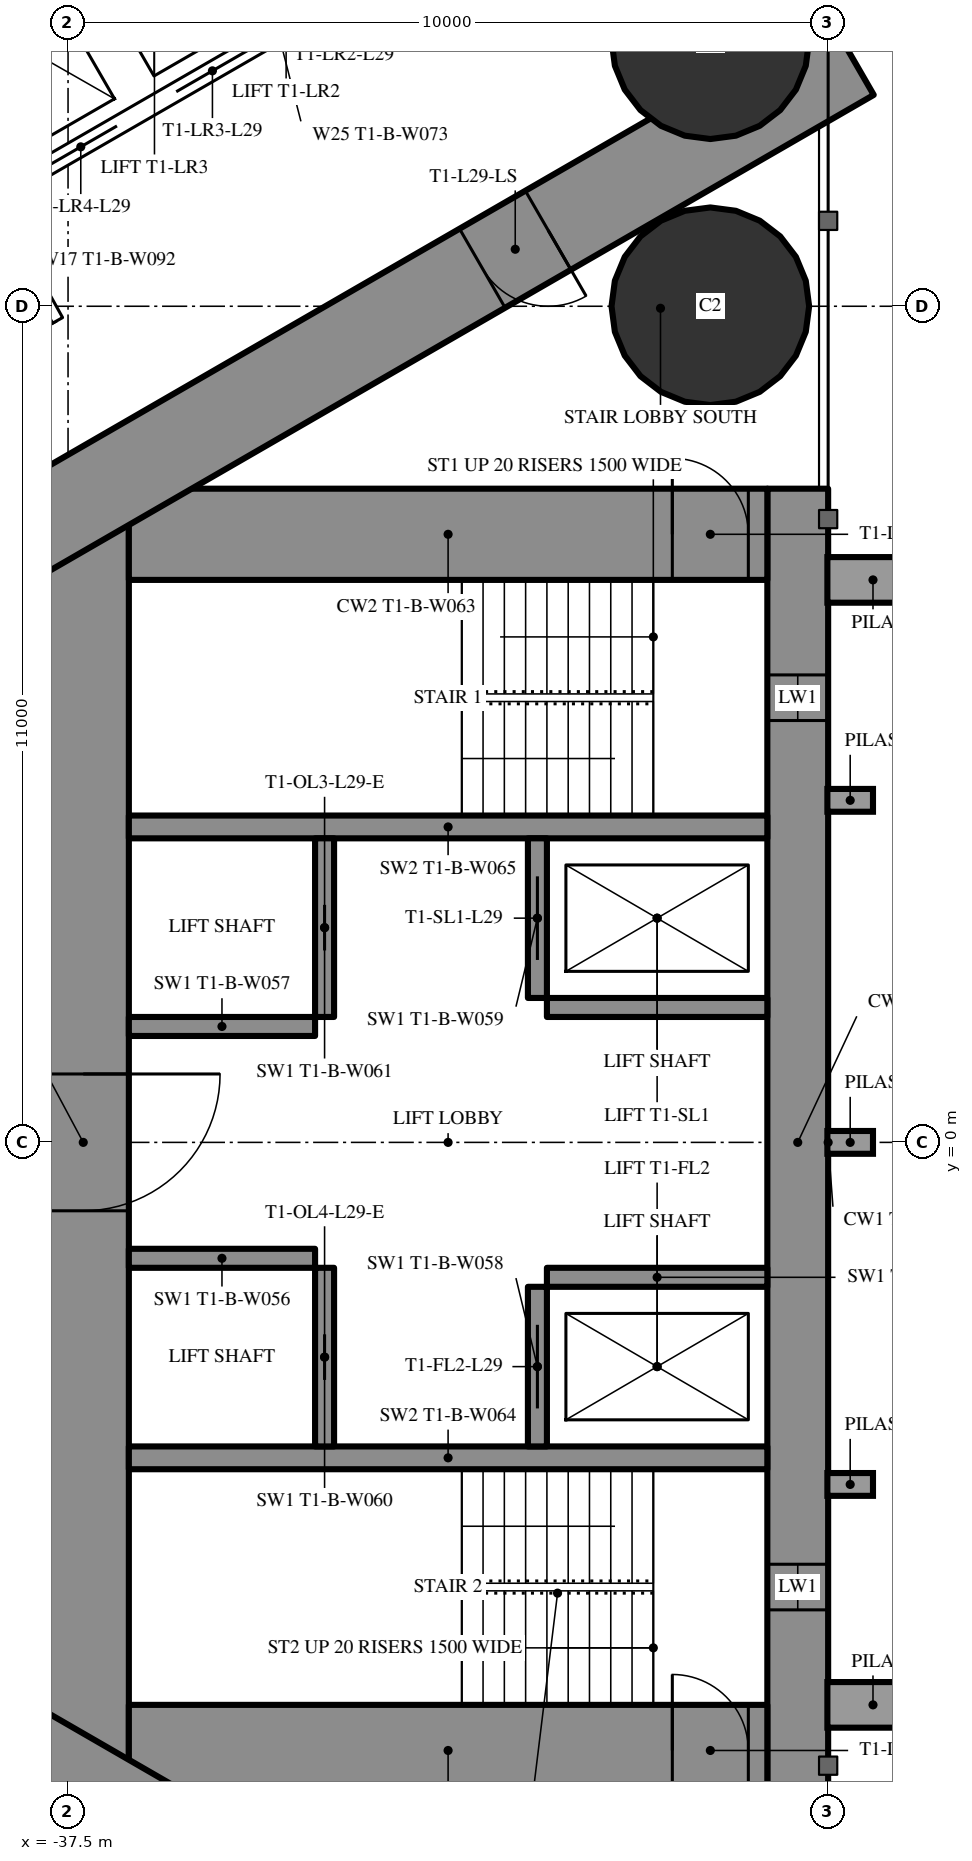
"""IFC4 building model, lengths in metres.
Left out: names, types, materials, properties, quantities, classifications, styles, units other than length and angle.
Written with IfcOpenShell. Run it as: python <this file> out.ifc"""

import sys

from ifc_helpers import new_model, si_unit, direction, frame, frame_2d, origin, origin_2d, place, context, subcontext, project, spatial, rectangle, hollow_circle, extrude, element, fill, save


model = new_model("IFC4")
c1 = context("Model", 3, precision=1e-05, world=origin(), true_north=direction((0.0, 1.0)))
c2 = subcontext(c1, "Body", "Model", "MODEL_VIEW")
j1 = project(units=[si_unit("LENGTHUNIT", "METRE"), si_unit("PLANEANGLEUNIT", "RADIAN")], contexts=[c1])
p1 = place(None, origin())
s1 = spatial("IfcSite", under=j1, at=p1, CompositionType="ELEMENT")
p2 = place(p1, origin())
s2 = spatial("IfcBuilding", under=s1, at=p2, CompositionType="ELEMENT")
p3 = place(p2, frame((0.0, 0.0, 111.6)))
s3 = spatial("IfcBuildingStorey", under=s2, at=p3, CompositionType="ELEMENT", Elevation=111.6)
for number, where, z_axis, x_axis in (
    (1, (-29.05, 11.0, 0.0), (0.0, 0.0, 1.0), (1.0, 0.0, 0.0)),
    (2, (-29.05, 14.5, 0.0), (0.0, 0.0, 1.0), (1.0, 0.0, 0.0)),
):
    element("IfcColumn", number, at=place(p3, frame(where, z_axis=z_axis, x_axis=x_axis)), inside=s3, PredefinedType="COLUMN", context=c2, shape_type="SweptSolid", body=[
        extrude(hollow_circle(Radius=1.3, WallThickness=0.1, at=origin_2d()), origin(), (0.0, 0.0, 1.0), 3.5),
    ])
p4 = place(p3, frame((-27.9, 8.6, 0.0), z_axis=(0.0, 0.0, 1.0), x_axis=(0.0, -1.0, 0.0)))
e3 = element("IfcWall", 3, at=p4, inside=s3, PredefinedType="SHEAR", context=c2, shape_type="SweptSolid", body=[
    extrude(rectangle(XDim=17.2, YDim=0.8, at=frame_2d((8.6, 0.0))), origin(), (0.0, 0.0, 1.0), 3.5),
])
p5 = place(p4, frame((2.45, 0.0, 0.6)))
e4 = element("IfcOpeningElement", 4, at=p5, cuts=e3, PredefinedType="OPENING", context=c2, shape_type="SweptSolid", body=[
    extrude(rectangle(XDim=0.6, YDim=2.1, at=frame_2d((0.3, 1.05))), frame((0.0, 0.41, 0.0), z_axis=(0.0, -1.0, 0.0), x_axis=(1.0, 0.0, 0.0)), (0.0, 0.0, 1.0), 0.82),
])
p6 = place(p4, frame((14.15, 0.0, 0.6)))
e5 = element("IfcOpeningElement", 5, at=p6, cuts=e3, PredefinedType="OPENING", context=c2, shape_type="SweptSolid", body=[
    extrude(rectangle(XDim=0.6, YDim=2.1, at=frame_2d((0.3, 1.05))), frame((0.0, 0.41, 0.0), z_axis=(0.0, -1.0, 0.0), x_axis=(1.0, 0.0, 0.0)), (0.0, 0.0, 1.0), 0.82),
])
p7 = place(p3, frame((-37.3, 8.6, 0.0), z_axis=(0.0, 0.0, 1.0), x_axis=(0.0, -1.0, 0.0)))
e6 = element("IfcWall", 6, at=p7, inside=s3, PredefinedType="SHEAR", context=c2, shape_type="SweptSolid", body=[
    extrude(rectangle(XDim=17.2, YDim=1.2, at=frame_2d((8.6, 0.0))), origin(), (0.0, 0.0, 1.0), 3.5),
])
p8 = place(p7, frame((7.7, 0.0, 0.0)))
e7 = element("IfcOpeningElement", 7, at=p8, cuts=e6, PredefinedType="OPENING", context=c2, shape_type="SweptSolid", body=[
    extrude(rectangle(XDim=1.8, YDim=2.2, at=frame_2d((0.9, 1.1))), frame((0.0, 0.61, 0.0), z_axis=(0.0, -1.0, 0.0), x_axis=(1.0, 0.0, 0.0)), (0.0, 0.0, 1.0), 1.22),
])
p9 = place(p3, frame((-28.3, 8.0, 0.0), z_axis=(0.0, 0.0, 1.0), x_axis=(-1.0, 0.0, 0.0)))
e8 = element("IfcWall", 8, at=p9, inside=s3, PredefinedType="SHEAR", context=c2, shape_type="SweptSolid", body=[
    extrude(rectangle(XDim=8.4, YDim=1.2, at=frame_2d((4.2, 0.0))), origin(), (0.0, 0.0, 1.0), 3.5),
])
p10 = place(p9, frame((0.25, 0.0, 0.0)))
e9 = element("IfcOpeningElement", 9, at=p10, cuts=e8, PredefinedType="OPENING", context=c2, shape_type="SweptSolid", body=[
    extrude(rectangle(XDim=1.0, YDim=2.2, at=frame_2d((0.5, 1.1))), frame((0.0, 0.61, 0.0), z_axis=(0.0, -1.0, 0.0), x_axis=(1.0, 0.0, 0.0)), (0.0, 0.0, 1.0), 1.22),
])
p11 = place(p3, frame((-28.3, -8.0, 0.0), z_axis=(0.0, 0.0, 1.0), x_axis=(-1.0, 0.0, 0.0)))
e10 = element("IfcWall", 10, at=p11, inside=s3, PredefinedType="SHEAR", context=c2, shape_type="SweptSolid", body=[
    extrude(rectangle(XDim=8.4, YDim=1.2, at=frame_2d((4.2, 0.0))), origin(), (0.0, 0.0, 1.0), 3.5),
])
p12 = place(p11, frame((0.25, 0.0, 0.0)))
e11 = element("IfcOpeningElement", 11, at=p12, cuts=e10, PredefinedType="OPENING", context=c2, shape_type="SweptSolid", body=[
    extrude(rectangle(XDim=1.0, YDim=2.2, at=frame_2d((0.5, 1.1))), frame((0.0, 0.61, 0.0), z_axis=(0.0, -1.0, 0.0), x_axis=(1.0, 0.0, 0.0)), (0.0, 0.0, 1.0), 1.22),
])
for number, where, z_axis, x_axis in (
    (12, (-28.3, 4.15, 0.0), (0.0, 0.0, 1.0), (-1.0, 0.0, 0.0)),
    (13, (-28.3, -4.15, 0.0), (0.0, 0.0, 1.0), (-1.0, 0.0, 0.0)),
):
    element("IfcWall", number, at=place(p3, frame(where, z_axis=z_axis, x_axis=x_axis)), inside=s3, PredefinedType="SHEAR", context=c2, shape_type="SweptSolid", body=[
        extrude(rectangle(XDim=8.4, YDim=0.3, at=frame_2d((4.2, 0.0))), origin(), (0.0, 0.0, 1.0), 3.5),
    ])
p13 = place(p3, frame((-31.325, 4.0, 0.0), z_axis=(0.0, 0.0, 1.0), x_axis=(0.0, -1.0, 0.0)))
e14 = element("IfcWall", 14, at=p13, inside=s3, PredefinedType="SHEAR", context=c2, shape_type="SweptSolid", body=[
    extrude(rectangle(XDim=2.1, YDim=0.25, at=frame_2d((1.05, 0.0))), origin(), (0.0, 0.0, 1.0), 3.5),
])
p14 = place(p13, frame((0.5, 0.0, 0.0)))
e15 = element("IfcOpeningElement", 15, at=p14, cuts=e14, PredefinedType="OPENING", context=c2, shape_type="SweptSolid", body=[
    extrude(rectangle(XDim=1.1, YDim=2.2, at=frame_2d((0.55, 1.1))), frame((0.0, 0.135, 0.0), z_axis=(0.0, -1.0, 0.0), x_axis=(1.0, 0.0, 0.0)), (0.0, 0.0, 1.0), 0.27),
])
p15 = place(p3, frame((-34.125, 4.0, 0.0), z_axis=(0.0, 0.0, 1.0), x_axis=(0.0, -1.0, 0.0)))
e16 = element("IfcWall", 16, at=p15, inside=s3, PredefinedType="SHEAR", context=c2, shape_type="SweptSolid", body=[
    extrude(rectangle(XDim=2.35, YDim=0.25, at=frame_2d((1.175, 0.0))), origin(), (0.0, 0.0, 1.0), 3.5),
])
p16 = place(p15, frame((0.875, 0.0, 0.0)))
e17 = element("IfcOpeningElement", 17, at=p16, cuts=e16, PredefinedType="OPENING", context=c2, shape_type="SweptSolid", body=[
    extrude(rectangle(XDim=0.6, YDim=2.0, at=frame_2d((0.3, 1.0))), frame((0.0, 0.135, 0.0), z_axis=(0.0, -1.0, 0.0), x_axis=(1.0, 0.0, 0.0)), (0.0, 0.0, 1.0), 0.27),
])
p17 = place(p3, frame((-28.3, 1.775, 0.0), z_axis=(0.0, 0.0, 1.0), x_axis=(-1.0, 0.0, 0.0)))
e18 = element("IfcWall", 18, at=p17, inside=s3, PredefinedType="SHEAR", context=c2, shape_type="SweptSolid", body=[
    extrude(rectangle(XDim=2.9, YDim=0.25, at=frame_2d((1.45, 0.0))), origin(), (0.0, 0.0, 1.0), 3.5),
])
p18 = place(p3, frame((-34.25, 1.525, 0.0), z_axis=(0.0, 0.0, 1.0), x_axis=(-1.0, 0.0, 0.0)))
e19 = element("IfcWall", 19, at=p18, inside=s3, PredefinedType="SHEAR", context=c2, shape_type="SweptSolid", body=[
    extrude(rectangle(XDim=2.45, YDim=0.25, at=frame_2d((1.225, 0.0))), origin(), (0.0, 0.0, 1.0), 3.5),
])
p19 = place(p3, frame((-31.325, -1.9, 0.0), z_axis=(0.0, 0.0, 1.0), x_axis=(0.0, -1.0, 0.0)))
e20 = element("IfcWall", 20, at=p19, inside=s3, PredefinedType="SHEAR", context=c2, shape_type="SweptSolid", body=[
    extrude(rectangle(XDim=2.1, YDim=0.25, at=frame_2d((1.05, 0.0))), origin(), (0.0, 0.0, 1.0), 3.5),
])
p20 = place(p19, frame((0.5, 0.0, 0.0)))
e21 = element("IfcOpeningElement", 21, at=p20, cuts=e20, PredefinedType="OPENING", context=c2, shape_type="SweptSolid", body=[
    extrude(rectangle(XDim=1.1, YDim=2.2, at=frame_2d((0.55, 1.1))), frame((0.0, 0.135, 0.0), z_axis=(0.0, -1.0, 0.0), x_axis=(1.0, 0.0, 0.0)), (0.0, 0.0, 1.0), 0.27),
])
p21 = place(p3, frame((-34.125, -1.65, 0.0), z_axis=(0.0, 0.0, 1.0), x_axis=(0.0, -1.0, 0.0)))
e22 = element("IfcWall", 22, at=p21, inside=s3, PredefinedType="SHEAR", context=c2, shape_type="SweptSolid", body=[
    extrude(rectangle(XDim=2.35, YDim=0.25, at=frame_2d((1.175, 0.0))), origin(), (0.0, 0.0, 1.0), 3.5),
])
p22 = place(p21, frame((0.875, 0.0, 0.0)))
e23 = element("IfcOpeningElement", 23, at=p22, cuts=e22, PredefinedType="OPENING", context=c2, shape_type="SweptSolid", body=[
    extrude(rectangle(XDim=0.6, YDim=2.0, at=frame_2d((0.3, 1.0))), frame((0.0, 0.135, 0.0), z_axis=(0.0, -1.0, 0.0), x_axis=(1.0, 0.0, 0.0)), (0.0, 0.0, 1.0), 0.27),
])
p23 = place(p3, frame((-28.3, -1.775, 0.0), z_axis=(0.0, 0.0, 1.0), x_axis=(-1.0, 0.0, 0.0)))
e24 = element("IfcWall", 24, at=p23, inside=s3, PredefinedType="SHEAR", context=c2, shape_type="SweptSolid", body=[
    extrude(rectangle(XDim=2.9, YDim=0.25, at=frame_2d((1.45, 0.0))), origin(), (0.0, 0.0, 1.0), 3.5),
])
p24 = place(p3, frame((-34.25, -1.525, 0.0), z_axis=(0.0, 0.0, 1.0), x_axis=(-1.0, 0.0, 0.0)))
e25 = element("IfcWall", 25, at=p24, inside=s3, PredefinedType="SHEAR", context=c2, shape_type="SweptSolid", body=[
    extrude(rectangle(XDim=2.45, YDim=0.25, at=frame_2d((1.225, 0.0))), origin(), (0.0, 0.0, 1.0), 3.5),
])
p25 = place(p3, frame((-27.2, 14.3, 0.0), z_axis=(0.0, 0.0, 1.0), x_axis=(-0.866026593062, -0.499997940104, 0.0)))
e26 = element("IfcWall", 26, at=p25, inside=s3, PredefinedType="SHEAR", context=c2, shape_type="SweptSolid", body=[
    extrude(rectangle(XDim=28.946, YDim=1.2, at=frame_2d((14.473, 0.0))), origin(), (0.0, 0.0, 1.0), 3.5),
])
p26 = place(p25, frame((4.6, 0.0, 0.0)))
e27 = element("IfcOpeningElement", 27, at=p26, cuts=e26, PredefinedType="OPENING", context=c2, shape_type="SweptSolid", body=[
    extrude(rectangle(XDim=1.0, YDim=2.2, at=frame_2d((0.5, 1.1))), frame((0.0, 0.61, 0.0), z_axis=(0.0, -1.0, 0.0), x_axis=(1.0, 0.0, 0.0)), (0.0, 0.0, 1.0), 1.22),
])
p27 = place(p25, frame((13.395, 0.0, 0.0)))
e28 = element("IfcOpeningElement", 28, at=p27, cuts=e26, PredefinedType="OPENING", context=c2, shape_type="SweptSolid", body=[
    extrude(rectangle(XDim=1.8, YDim=2.2, at=frame_2d((0.9, 1.1))), frame((0.0, 0.61, 0.0), z_axis=(0.0, -1.0, 0.0), x_axis=(1.0, 0.0, 0.0)), (0.0, 0.0, 1.0), 1.22),
])
p28 = place(p3, frame((-27.2, -14.3, 0.0), z_axis=(0.0, 0.0, 1.0), x_axis=(-0.866024021859, 0.500002393557, 0.0)))
e29 = element("IfcWall", 29, at=p28, inside=s3, PredefinedType="SHEAR", context=c2, shape_type="SweptSolid", body=[
    extrude(rectangle(XDim=27.907, YDim=1.2, at=frame_2d((13.954, 0.0))), origin(), (0.0, 0.0, 1.0), 3.5),
])
p29 = place(p28, frame((4.6, 0.0, 0.0)))
e30 = element("IfcOpeningElement", 30, at=p29, cuts=e29, PredefinedType="OPENING", context=c2, shape_type="SweptSolid", body=[
    extrude(rectangle(XDim=1.0, YDim=2.2, at=frame_2d((0.5, 1.1))), frame((0.0, 0.61, 0.0), z_axis=(0.0, -1.0, 0.0), x_axis=(1.0, 0.0, 0.0)), (0.0, 0.0, 1.0), 1.22),
])
p30 = place(p28, frame((13.395, 0.0, 0.0)))
e31 = element("IfcOpeningElement", 31, at=p30, cuts=e29, PredefinedType="OPENING", context=c2, shape_type="SweptSolid", body=[
    extrude(rectangle(XDim=1.8, YDim=2.2, at=frame_2d((0.9, 1.1))), frame((0.0, 0.61, 0.0), z_axis=(0.0, -1.0, 0.0), x_axis=(1.0, 0.0, 0.0)), (0.0, 0.0, 1.0), 1.22),
])
p31 = place(p3, frame((-37.7, 10.894, 0.0), z_axis=(0.0, 0.0, 1.0), x_axis=(-0.866027905338, -0.499995667157, 0.0)))
e32 = element("IfcWall", 32, at=p31, inside=s3, PredefinedType="PARTITIONING", context=c2, shape_type="SweptSolid", body=[
    extrude(rectangle(XDim=21.787, YDim=0.2, at=frame_2d((10.894, 0.0))), origin(), (0.0, 0.0, 1.0), 3.25),
])
p32 = place(p31, frame((11.23, 0.0, 0.0)))
e33 = element("IfcOpeningElement", 33, at=p32, cuts=e32, PredefinedType="OPENING", context=c2, shape_type="SweptSolid", body=[
    extrude(rectangle(XDim=0.95, YDim=2.2, at=frame_2d((0.475, 1.1))), frame((0.0, 0.11, 0.0), z_axis=(0.0, -1.0, 0.0), x_axis=(1.0, 0.0, 0.0)), (0.0, 0.0, 1.0), 0.22),
])
p33 = place(p31, frame((9.531, 0.0, 0.0)))
e34 = element("IfcOpeningElement", 34, at=p33, cuts=e32, PredefinedType="OPENING", context=c2, shape_type="SweptSolid", body=[
    extrude(rectangle(XDim=0.95, YDim=2.2, at=frame_2d((0.475, 1.1))), frame((0.0, 0.11, 0.0), z_axis=(0.0, -1.0, 0.0), x_axis=(1.0, 0.0, 0.0)), (0.0, 0.0, 1.0), 0.22),
])
p34 = place(p3, frame((-38.513, 12.392, 0.0), z_axis=(0.0, 0.0, 1.0), x_axis=(0.485585508183, -0.874189175317, 0.0)))
e35 = element("IfcWall", 35, at=p34, inside=s3, PredefinedType="PARTITIONING", context=c2, shape_type="SweptSolid", body=[
    extrude(rectangle(XDim=1.805, YDim=0.15, at=frame_2d((0.902, 0.0))), origin(), (0.0, 0.0, 1.0), 3.25),
])
p35 = place(p3, frame((-36.92, -11.344, 0.0), z_axis=(0.0, 0.0, 1.0), x_axis=(-0.866027897759, 0.499995680284, 0.0)))
e36 = element("IfcWall", 36, at=p35, inside=s3, PredefinedType="PARTITIONING", context=c2, shape_type="SweptSolid", body=[
    extrude(rectangle(XDim=11.731, YDim=0.2, at=frame_2d((5.865, 0.0))), origin(), (0.0, 0.0, 1.0), 3.25),
])
p36 = place(p35, frame((3.35, 0.0, 0.0)))
e37 = element("IfcOpeningElement", 37, at=p36, cuts=e36, PredefinedType="OPENING", context=c2, shape_type="SweptSolid", body=[
    extrude(rectangle(XDim=1.0, YDim=2.2, at=frame_2d((0.5, 1.1))), frame((0.0, 0.11, 0.0), z_axis=(0.0, -1.0, 0.0), x_axis=(1.0, 0.0, 0.0)), (0.0, 0.0, 1.0), 0.22),
])
p37 = place(p3, frame((-31.01, 16.747, 0.0), z_axis=(0.0, 0.0, 1.0), x_axis=(-0.866028165386, -0.499995216735, 0.0)))
e38 = element("IfcWall", 38, at=p37, inside=s3, PredefinedType="PARTITIONING", context=c2, shape_type="SweptSolid", body=[
    extrude(rectangle(XDim=8.6, YDim=0.25, at=frame_2d((4.3, 0.0))), origin(), (0.0, 0.0, 1.0), 3.25),
])
p38 = place(p37, frame((0.75, 0.0, 0.0)))
e39 = element("IfcOpeningElement", 39, at=p38, cuts=e38, PredefinedType="OPENING", context=c2, shape_type="SweptSolid", body=[
    extrude(rectangle(XDim=1.1, YDim=2.2, at=frame_2d((0.55, 1.1))), frame((0.0, 0.135, 0.0), z_axis=(0.0, -1.0, 0.0), x_axis=(1.0, 0.0, 0.0)), (0.0, 0.0, 1.0), 0.27),
])
p39 = place(p37, frame((2.75, 0.0, 0.0)))
e40 = element("IfcOpeningElement", 40, at=p39, cuts=e38, PredefinedType="OPENING", context=c2, shape_type="SweptSolid", body=[
    extrude(rectangle(XDim=1.1, YDim=2.2, at=frame_2d((0.55, 1.1))), frame((0.0, 0.135, 0.0), z_axis=(0.0, -1.0, 0.0), x_axis=(1.0, 0.0, 0.0)), (0.0, 0.0, 1.0), 0.27),
])
p40 = place(p37, frame((4.75, 0.0, 0.0)))
e41 = element("IfcOpeningElement", 41, at=p40, cuts=e38, PredefinedType="OPENING", context=c2, shape_type="SweptSolid", body=[
    extrude(rectangle(XDim=1.1, YDim=2.2, at=frame_2d((0.55, 1.1))), frame((0.0, 0.135, 0.0), z_axis=(0.0, -1.0, 0.0), x_axis=(1.0, 0.0, 0.0)), (0.0, 0.0, 1.0), 0.27),
])
p41 = place(p37, frame((6.75, 0.0, 0.0)))
e42 = element("IfcOpeningElement", 42, at=p41, cuts=e38, PredefinedType="OPENING", context=c2, shape_type="SweptSolid", body=[
    extrude(rectangle(XDim=1.1, YDim=2.2, at=frame_2d((0.55, 1.1))), frame((0.0, 0.135, 0.0), z_axis=(0.0, -1.0, 0.0), x_axis=(1.0, 0.0, 0.0)), (0.0, 0.0, 1.0), 0.27),
])
p42 = place(p26, origin())
e43 = element("IfcDoor", 43, at=p42, inside=s3, OperationType="SINGLE_SWING_LEFT", PredefinedType="DOOR", context=c2, shape_type="SweptSolid", body=[
    extrude(rectangle(XDim=1.0, YDim=2.2, at=frame_2d((0.5, 1.1))), frame((0.0, 0.025, 0.0), z_axis=(0.0, -1.0, 0.0), x_axis=(1.0, 0.0, 0.0)), (0.0, 0.0, 1.0), 0.05),
])
fill(e27, e43)
p43 = place(p8, origin())
e44 = element("IfcDoor", 44, at=p43, inside=s3, OperationType="DOUBLE_DOOR_SINGLE_SWING", PredefinedType="DOOR", context=c2, shape_type="SweptSolid", body=[
    extrude(rectangle(XDim=1.8, YDim=2.2, at=frame_2d((0.9, 1.1))), frame((0.0, 0.025, 0.0), z_axis=(0.0, -1.0, 0.0), x_axis=(1.0, 0.0, 0.0)), (0.0, 0.0, 1.0), 0.05),
])
fill(e7, e44)
p44 = place(p10, origin())
e45 = element("IfcDoor", 45, at=p44, inside=s3, OperationType="SINGLE_SWING_RIGHT", PredefinedType="DOOR", context=c2, shape_type="SweptSolid", body=[
    extrude(rectangle(XDim=1.0, YDim=2.2, at=frame_2d((0.5, 1.1))), frame((0.0, 0.025, 0.0), z_axis=(0.0, -1.0, 0.0), x_axis=(1.0, 0.0, 0.0)), (0.0, 0.0, 1.0), 0.05),
])
fill(e9, e45)
p45 = place(p12, origin())
e46 = element("IfcDoor", 46, at=p45, inside=s3, OperationType="SINGLE_SWING_RIGHT", PredefinedType="DOOR", context=c2, shape_type="SweptSolid", body=[
    extrude(rectangle(XDim=1.0, YDim=2.2, at=frame_2d((0.5, 1.1))), frame((0.0, 0.025, 0.0), z_axis=(0.0, -1.0, 0.0), x_axis=(1.0, 0.0, 0.0)), (0.0, 0.0, 1.0), 0.05),
])
fill(e11, e46)
p46 = place(p14, origin())
e47 = element("IfcDoor", 47, at=p46, inside=s3, OperationType="SLIDING_TO_LEFT", PredefinedType="USERDEFINED", context=c2, shape_type="SweptSolid", body=[
    extrude(rectangle(XDim=1.1, YDim=2.2, at=frame_2d((0.55, 1.1))), frame((0.0, 0.025, 0.0), z_axis=(0.0, -1.0, 0.0), x_axis=(1.0, 0.0, 0.0)), (0.0, 0.0, 1.0), 0.05),
])
fill(e15, e47)
p47 = place(p20, origin())
e48 = element("IfcDoor", 48, at=p47, inside=s3, OperationType="SLIDING_TO_LEFT", PredefinedType="USERDEFINED", context=c2, shape_type="SweptSolid", body=[
    extrude(rectangle(XDim=1.1, YDim=2.2, at=frame_2d((0.55, 1.1))), frame((0.0, 0.025, 0.0), z_axis=(0.0, -1.0, 0.0), x_axis=(1.0, 0.0, 0.0)), (0.0, 0.0, 1.0), 0.05),
])
fill(e21, e48)
p48 = place(p16, origin())
e49 = element("IfcDoor", 49, at=p48, inside=s3, OperationType="SLIDING_TO_LEFT", PredefinedType="DOOR", context=c2, shape_type="SweptSolid", body=[
    extrude(rectangle(XDim=0.6, YDim=2.0, at=frame_2d((0.3, 1.0))), frame((0.0, 0.025, 0.0), z_axis=(0.0, -1.0, 0.0), x_axis=(1.0, 0.0, 0.0)), (0.0, 0.0, 1.0), 0.05),
])
fill(e17, e49)
p49 = place(p22, origin())
e50 = element("IfcDoor", 50, at=p49, inside=s3, OperationType="SLIDING_TO_LEFT", PredefinedType="DOOR", context=c2, shape_type="SweptSolid", body=[
    extrude(rectangle(XDim=0.6, YDim=2.0, at=frame_2d((0.3, 1.0))), frame((0.0, 0.025, 0.0), z_axis=(0.0, -1.0, 0.0), x_axis=(1.0, 0.0, 0.0)), (0.0, 0.0, 1.0), 0.05),
])
fill(e23, e50)
p50 = place(p40, origin())
e51 = element("IfcDoor", 51, at=p50, inside=s3, OperationType="DOUBLE_DOOR_SLIDING", PredefinedType="USERDEFINED", context=c2, shape_type="SweptSolid", body=[
    extrude(rectangle(XDim=1.1, YDim=2.2, at=frame_2d((0.55, 1.1))), frame((0.0, 0.025, 0.0), z_axis=(0.0, -1.0, 0.0), x_axis=(1.0, 0.0, 0.0)), (0.0, 0.0, 1.0), 0.05),
])
fill(e41, e51)
p51 = place(p41, origin())
e52 = element("IfcDoor", 52, at=p51, inside=s3, OperationType="DOUBLE_DOOR_SLIDING", PredefinedType="USERDEFINED", context=c2, shape_type="SweptSolid", body=[
    extrude(rectangle(XDim=1.1, YDim=2.2, at=frame_2d((0.55, 1.1))), frame((0.0, 0.025, 0.0), z_axis=(0.0, -1.0, 0.0), x_axis=(1.0, 0.0, 0.0)), (0.0, 0.0, 1.0), 0.05),
])
fill(e42, e52)
p52 = place(p5, origin())
e53 = element("IfcWindow", 53, at=p52, inside=s3, PartitioningType="SINGLE_PANEL", PredefinedType="WINDOW", context=c2, shape_type="SweptSolid", body=[
    extrude(rectangle(XDim=0.6, YDim=2.1, at=frame_2d((0.3, 1.05))), frame((0.0, 0.03, 0.0), z_axis=(0.0, -1.0, 0.0), x_axis=(1.0, 0.0, 0.0)), (0.0, 0.0, 1.0), 0.06),
])
fill(e4, e53)
p53 = place(p6, origin())
e54 = element("IfcWindow", 54, at=p53, inside=s3, PartitioningType="SINGLE_PANEL", PredefinedType="WINDOW", context=c2, shape_type="SweptSolid", body=[
    extrude(rectangle(XDim=0.6, YDim=2.1, at=frame_2d((0.3, 1.05))), frame((0.0, 0.03, 0.0), z_axis=(0.0, -1.0, 0.0), x_axis=(1.0, 0.0, 0.0)), (0.0, 0.0, 1.0), 0.06),
])
fill(e5, e54)
save(model, sys.argv[1])
